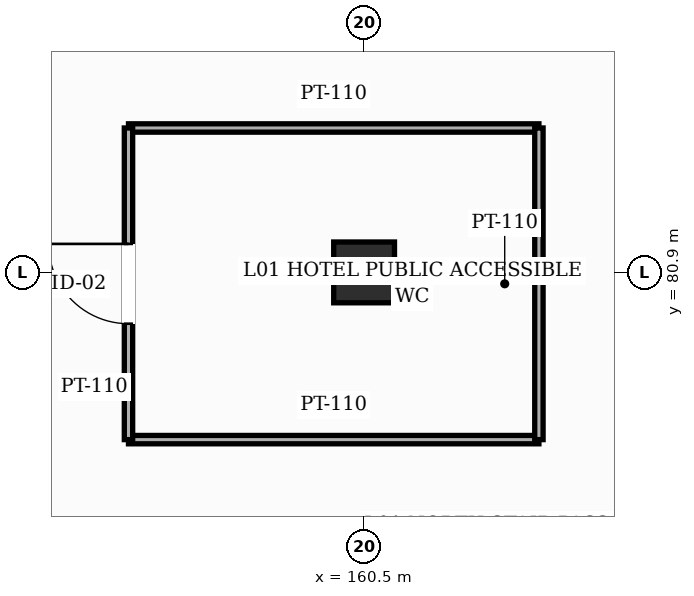
"""IFC4 building model, lengths in metres.
Left out: names, types, materials, properties, quantities, classifications, styles, units other than length and angle.
Written with IfcOpenShell. Run it as: python <this file> out.ifc"""

import sys

from ifc_helpers import new_model, si_unit, direction, frame, frame_2d, origin, origin_2d, place, context, subcontext, project, spatial, rectangle, hollow_rectangle, extrude, element, fill, save


model = new_model("IFC4")
c1 = context("Model", 3, precision=1e-05, world=origin(), true_north=direction((0.0, 1.0)))
c2 = subcontext(c1, "Body", "Model", "MODEL_VIEW")
j1 = project(units=[si_unit("LENGTHUNIT", "METRE"), si_unit("PLANEANGLEUNIT", "RADIAN")], contexts=[c1])
p1 = place(None, origin())
s1 = spatial("IfcSite", under=j1, at=p1, CompositionType="ELEMENT")
p2 = place(p1, origin())
s2 = spatial("IfcBuilding", under=s1, at=p2, CompositionType="ELEMENT")
p3 = place(p2, frame((0.0, 0.0, 5.4)))
s3 = spatial("IfcBuildingStorey", under=s2, at=p3, CompositionType="ELEMENT", Elevation=5.4)
p4 = place(p3, frame((160.5, 80.9, 0.0), z_axis=(0.0, 0.0, 1.0), x_axis=(1.0, 0.0, 0.0)))
e1 = element("IfcColumn", 1, at=p4, inside=s3, PredefinedType="COLUMN", context=c2, shape_type="SweptSolid", body=[
    extrude(hollow_rectangle(XDim=0.8, YDim=0.8, WallThickness=0.032, InnerFilletRadius=0.032, OuterFilletRadius=0.064, at=origin_2d()), origin(), (0.0, 0.0, 1.0), 4.8),
])
for number, where, z_axis, x_axis in (
    (2, (157.4, 78.7, 0.0), (0.0, 0.0, 1.0), (1.0, 0.0, 0.0)),
    (3, (157.4, 82.8, 0.0), (0.0, 0.0, 1.0), (1.0, 0.0, 0.0)),
):
    element("IfcWall", number, at=place(p3, frame(where, z_axis=z_axis, x_axis=x_axis)), inside=s3, PredefinedType="PARTITIONING", context=c2, shape_type="SweptSolid", body=[
        extrude(rectangle(XDim=5.4, YDim=0.11, at=frame_2d((2.7, 0.0))), origin(), (0.0, 0.0, 1.0), 4.535),
    ])
p5 = place(p3, frame((157.4, 78.7, 0.0), z_axis=(0.0, 0.0, 1.0), x_axis=(0.0, 1.0, 0.0)))
e4 = element("IfcWall", 4, at=p5, inside=s3, PredefinedType="PARTITIONING", context=c2, shape_type="SweptSolid", body=[
    extrude(rectangle(XDim=4.1, YDim=0.11, at=frame_2d((2.05, 0.0))), origin(), (0.0, 0.0, 1.0), 4.535),
])
p6 = place(p5, frame((1.525, 0.0, 0.0)))
e5 = element("IfcOpeningElement", 5, at=p6, cuts=e4, PredefinedType="OPENING", context=c2, shape_type="SweptSolid", body=[
    extrude(rectangle(XDim=1.05, YDim=2.2, at=frame_2d((0.525, 1.1))), frame((0.0, 0.065, 0.0), z_axis=(0.0, -1.0, 0.0), x_axis=(1.0, 0.0, 0.0)), (0.0, 0.0, 1.0), 0.13),
])
p7 = place(p3, frame((162.8, 78.7, 0.0), z_axis=(0.0, 0.0, 1.0), x_axis=(0.0, 1.0, 0.0)))
e6 = element("IfcWall", 6, at=p7, inside=s3, PredefinedType="PARTITIONING", context=c2, shape_type="SweptSolid", body=[
    extrude(rectangle(XDim=4.1, YDim=0.11, at=frame_2d((2.05, 0.0))), origin(), (0.0, 0.0, 1.0), 4.535),
])
p8 = place(p6, origin())
e7 = element("IfcDoor", 7, at=p8, inside=s3, OperationType="SINGLE_SWING_RIGHT", PredefinedType="DOOR", context=c2, shape_type="SweptSolid", body=[
    extrude(rectangle(XDim=1.05, YDim=2.2, at=frame_2d((0.525, 1.1))), frame((0.0, 0.025, 0.0), z_axis=(0.0, -1.0, 0.0), x_axis=(1.0, 0.0, 0.0)), (0.0, 0.0, 1.0), 0.05),
])
fill(e5, e7)
save(model, sys.argv[1])
